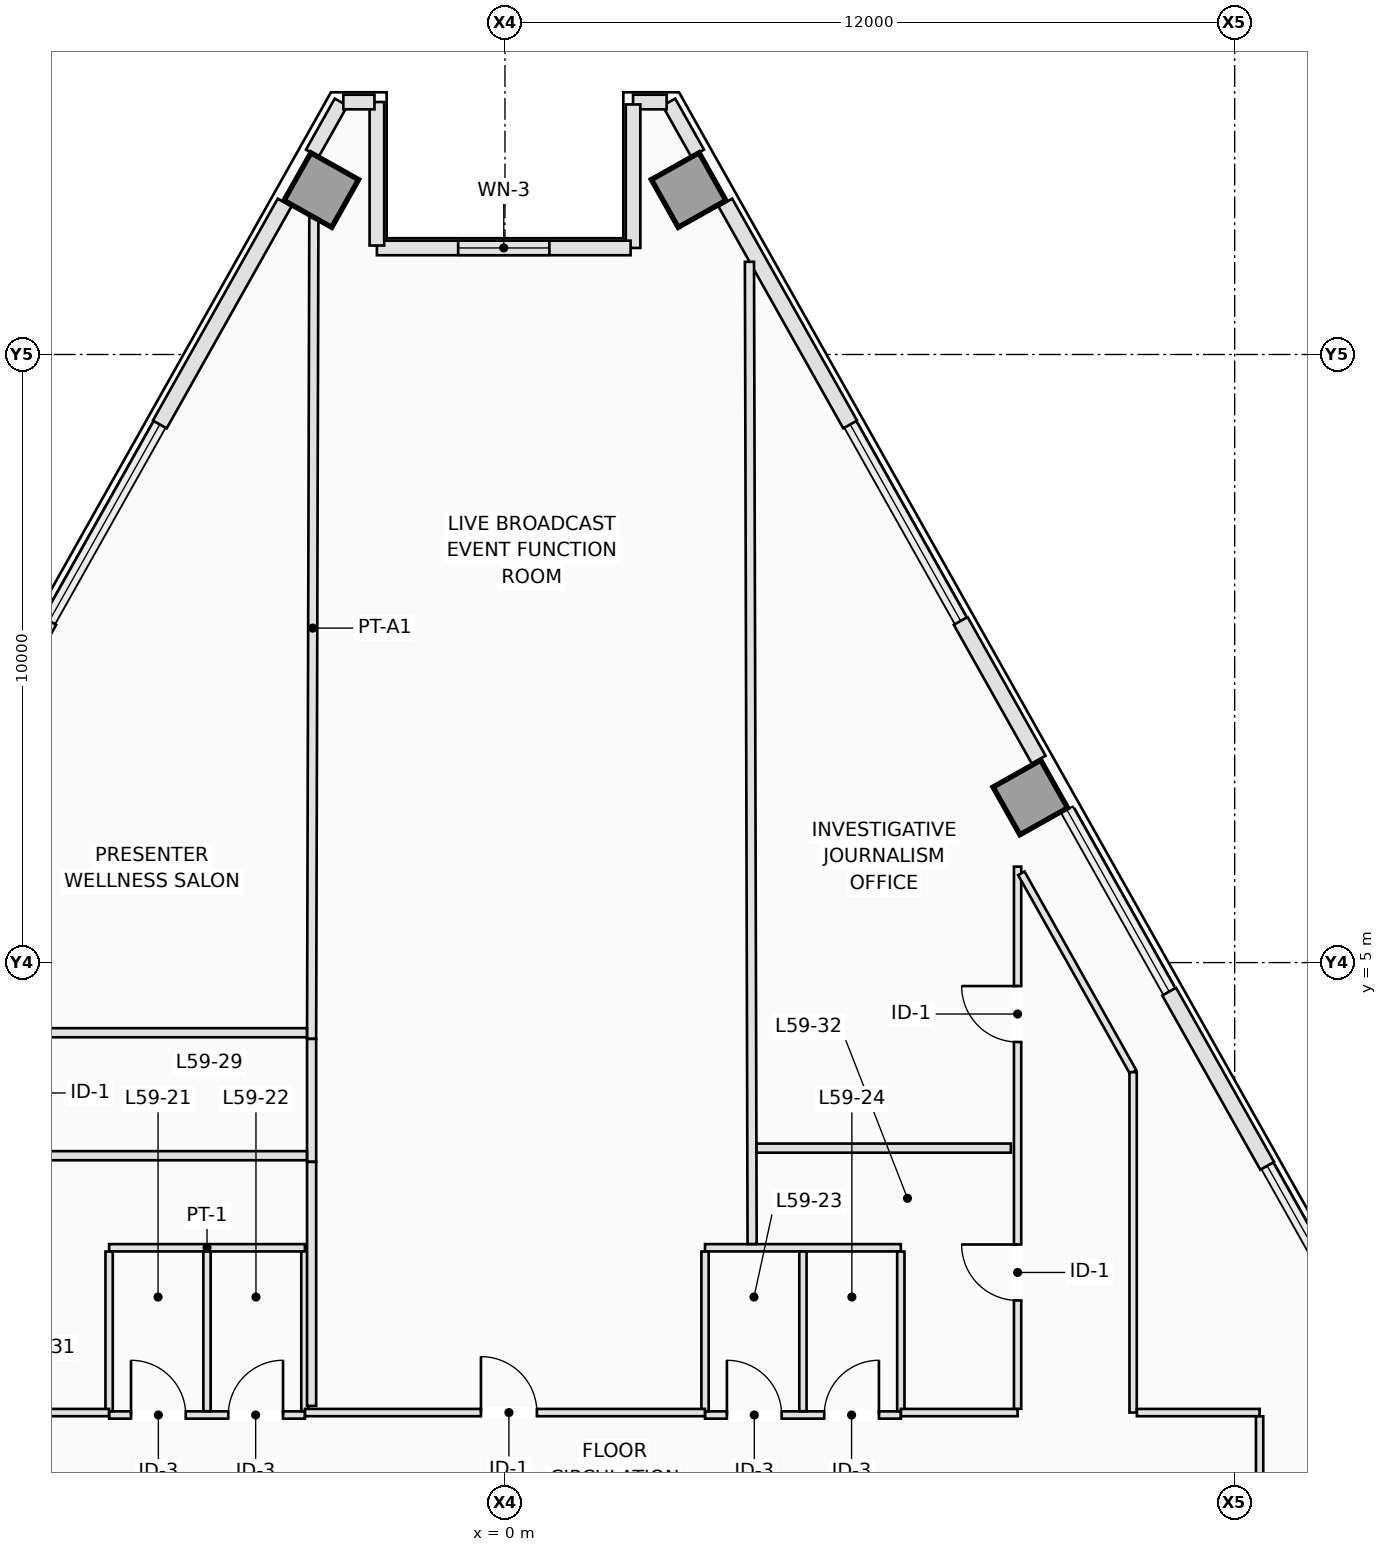
"""IFC4 building model, lengths in metres.
Left out: names, types, materials, properties, quantities, classifications, styles, units other than length and angle.
Written with IfcOpenShell. Run it as: python <this file> out.ifc"""

import sys

from ifc_helpers import new_model, si_unit, direction, frame, frame_2d, origin, origin_2d, place, context, subcontext, project, spatial, rectangle, extrude, element, fill, save


model = new_model("IFC4")
c1 = context("Model", 3, precision=1e-05, world=origin(), true_north=direction((0.0, 1.0)))
c2 = subcontext(c1, "Body", "Model", "MODEL_VIEW")
j1 = project(units=[si_unit("LENGTHUNIT", "METRE"), si_unit("PLANEANGLEUNIT", "RADIAN")], contexts=[c1])
p1 = place(None, origin())
s1 = spatial("IfcSite", under=j1, at=p1, CompositionType="ELEMENT")
p2 = place(p1, origin())
s2 = spatial("IfcBuilding", under=s1, at=p2, CompositionType="ELEMENT")
p3 = place(p2, frame((0.0, 0.0, 214.9)))
s3 = spatial("IfcBuildingStorey", under=s2, at=p3, CompositionType="ELEMENT", Elevation=214.9)
for number, where, z_axis, x_axis in (
    (1, (8.64, 7.715, 0.0), (0.0, 0.0, 1.0), (0.872, 0.49, 0.0)),
    (2, (3.021, 17.704, 0.0), (0.0, 0.0, 1.0), (0.872, 0.49, 0.0)),
    (3, (-3.021, 17.704, 0.0), (0.0, 0.0, 1.0), (-0.872, 0.49, 0.0)),
):
    element("IfcColumn", number, at=place(p3, frame(where, z_axis=z_axis, x_axis=x_axis)), inside=s3, PredefinedType="COLUMN", context=c2, shape_type="SweptSolid", body=[
        extrude(rectangle(XDim=0.9, YDim=0.9, at=origin_2d()), origin(), (0.0, 0.0, 1.0), 3.5),
    ])
p4 = place(p3, frame((2.695, 19.149, 0.0), z_axis=(0.0, 0.0, 1.0), x_axis=(0.490345412687, -0.87152818443, 0.0)))
e4 = element("IfcWall", 4, at=p4, inside=s3, PredefinedType="STANDARD", context=c2, shape_type="SweptSolid", body=[
    extrude(rectangle(XDim=0.964, YDim=0.24, at=frame_2d((0.482, 0.0))), origin(), (0.0, 0.0, 1.0), 3.25),
])
p5 = place(p3, frame((3.624, 17.499, 0.0), z_axis=(0.0, 0.0, 1.0), x_axis=(0.490275081837, -0.87156775074, 0.0)))
e5 = element("IfcWall", 5, at=p5, inside=s3, PredefinedType="STANDARD", context=c2, shape_type="SweptSolid", body=[
    extrude(rectangle(XDim=4.187, YDim=0.26, at=frame_2d((2.094, 0.0))), origin(), (0.0, 0.0, 1.0), 3.25),
])
p6 = place(p3, frame((7.494, 10.618, 0.0), z_axis=(0.0, 0.0, 1.0), x_axis=(0.490301099378, -0.871553114818, 0.0)))
e6 = element("IfcWall", 6, at=p6, inside=s3, PredefinedType="STANDARD", context=c2, shape_type="SweptSolid", body=[
    extrude(rectangle(XDim=2.617, YDim=0.26, at=frame_2d((1.309, 0.0))), origin(), (0.0, 0.0, 1.0), 3.25),
])
p7 = place(p3, frame((10.923, 4.522, 0.0), z_axis=(0.0, 0.0, 1.0), x_axis=(0.490264765862, -0.871573553611, 0.0)))
e7 = element("IfcWall", 7, at=p7, inside=s3, PredefinedType="STANDARD", context=c2, shape_type="SweptSolid", body=[
    extrude(rectangle(XDim=3.287, YDim=0.26, at=frame_2d((1.644, 0.0))), origin(), (0.0, 0.0, 1.0), 3.25),
])
p8 = place(p3, frame((-3.168, 18.309, 0.0), z_axis=(0.0, 0.0, 1.0), x_axis=(0.490345412687, 0.87152818443, 0.0)))
e8 = element("IfcWall", 8, at=p8, inside=s3, PredefinedType="STANDARD", context=c2, shape_type="SweptSolid", body=[
    extrude(rectangle(XDim=0.964, YDim=0.24, at=frame_2d((0.482, 0.0))), origin(), (0.0, 0.0, 1.0), 3.25),
])
p9 = place(p3, frame((-8.777, 8.337, 0.0), z_axis=(0.0, 0.0, 1.0), x_axis=(0.490301099378, 0.871553114818, 0.0)))
e9 = element("IfcWall", 9, at=p9, inside=s3, PredefinedType="STANDARD", context=c2, shape_type="SweptSolid", body=[
    extrude(rectangle(XDim=2.617, YDim=0.26, at=frame_2d((1.309, 0.0))), origin(), (0.0, 0.0, 1.0), 3.25),
])
p10 = place(p3, frame((-5.677, 13.85, 0.0), z_axis=(0.0, 0.0, 1.0), x_axis=(0.490275081837, 0.87156775074, 0.0)))
e10 = element("IfcWall", 10, at=p10, inside=s3, PredefinedType="STANDARD", context=c2, shape_type="SweptSolid", body=[
    extrude(rectangle(XDim=4.187, YDim=0.26, at=frame_2d((2.094, 0.0))), origin(), (0.0, 0.0, 1.0), 3.25),
])
p11 = place(p3, frame((2.658, 19.152, 0.0), z_axis=(0.0, 0.0, 1.0), x_axis=(-1.0, 0.0, 0.0)))
e11 = element("IfcWall", 11, at=p11, inside=s3, PredefinedType="STANDARD", context=c2, shape_type="SweptSolid", body=[
    extrude(rectangle(XDim=0.552, YDim=0.24, at=frame_2d((0.276, 0.0))), origin(), (0.0, 0.0, 1.0), 3.25),
])
p12 = place(p3, frame((2.106, 19.112, 0.0), z_axis=(0.0, 0.0, 1.0), x_axis=(0.0, -1.0, 0.0)))
e12 = element("IfcWall", 12, at=p12, inside=s3, PredefinedType="STANDARD", context=c2, shape_type="SweptSolid", body=[
    extrude(rectangle(XDim=2.36, YDim=0.24, at=frame_2d((1.18, 0.0))), origin(), (0.0, 0.0, 1.0), 3.25),
])
p13 = place(p3, frame((2.066, 16.752, 0.0), z_axis=(0.0, 0.0, 1.0), x_axis=(-1.0, 0.0, 0.0)))
e13 = element("IfcWall", 13, at=p13, inside=s3, PredefinedType="STANDARD", context=c2, shape_type="SweptSolid", body=[
    extrude(rectangle(XDim=4.172, YDim=0.24, at=frame_2d((2.086, 0.0))), origin(), (0.0, 0.0, 1.0), 3.25),
])
p14 = place(p13, frame((1.336, 0.0, 0.9)))
e14 = element("IfcOpeningElement", 14, at=p14, cuts=e13, PredefinedType="OPENING", context=c2, shape_type="SweptSolid", body=[
    extrude(rectangle(XDim=1.5, YDim=1.95, at=frame_2d((0.75, 0.975))), frame((0.0, 0.13, 0.0), z_axis=(0.0, -1.0, 0.0), x_axis=(1.0, 0.0, 0.0)), (0.0, 0.0, 1.0), 0.26),
])
p15 = place(p3, frame((-2.106, 16.792, 0.0), z_axis=(0.0, 0.0, 1.0), x_axis=(0.0, 1.0, 0.0)))
e15 = element("IfcWall", 15, at=p15, inside=s3, PredefinedType="STANDARD", context=c2, shape_type="SweptSolid", body=[
    extrude(rectangle(XDim=2.36, YDim=0.24, at=frame_2d((1.18, 0.0))), origin(), (0.0, 0.0, 1.0), 3.25),
])
p16 = place(p3, frame((-2.146, 19.152, 0.0), z_axis=(0.0, 0.0, 1.0), x_axis=(-1.0, 0.0, 0.0)))
e16 = element("IfcWall", 16, at=p16, inside=s3, PredefinedType="STANDARD", context=c2, shape_type="SweptSolid", body=[
    extrude(rectangle(XDim=0.512, YDim=0.24, at=frame_2d((0.256, 0.0))), origin(), (0.0, 0.0, 1.0), 3.25),
])
p17 = place(p3, frame((-6.51, -2.44, 0.0), z_axis=(0.0, 0.0, 1.0), x_axis=(1.0, 0.0, 0.0)))
e17 = element("IfcWall", 17, at=p17, inside=s3, PredefinedType="PARTITIONING", context=c2, shape_type="SweptSolid", body=[
    extrude(rectangle(XDim=3.22, YDim=0.12, at=frame_2d((1.61, 0.0))), origin(), (0.0, 0.0, 1.0), 2.943),
])
p18 = place(p17, frame((0.36, 0.0, 0.0)))
e18 = element("IfcOpeningElement", 18, at=p18, cuts=e17, PredefinedType="OPENING", context=c2, shape_type="SweptSolid", body=[
    extrude(rectangle(XDim=0.9, YDim=2.12, at=frame_2d((0.45, 1.06))), frame((0.0, 0.07, 0.0), z_axis=(0.0, -1.0, 0.0), x_axis=(1.0, 0.0, 0.0)), (0.0, 0.0, 1.0), 0.14),
])
p19 = place(p17, frame((1.96, 0.0, 0.0)))
e19 = element("IfcOpeningElement", 19, at=p19, cuts=e17, PredefinedType="OPENING", context=c2, shape_type="SweptSolid", body=[
    extrude(rectangle(XDim=0.9, YDim=2.12, at=frame_2d((0.45, 1.06))), frame((0.0, 0.07, 0.0), z_axis=(0.0, -1.0, 0.0), x_axis=(1.0, 0.0, 0.0)), (0.0, 0.0, 1.0), 0.14),
])
p20 = place(p3, frame((-6.51, 0.31, 0.0), z_axis=(0.0, 0.0, 1.0), x_axis=(1.0, 0.0, 0.0)))
e20 = element("IfcWall", 20, at=p20, inside=s3, PredefinedType="PARTITIONING", context=c2, shape_type="SweptSolid", body=[
    extrude(rectangle(XDim=3.22, YDim=0.12, at=frame_2d((1.61, 0.0))), origin(), (0.0, 0.0, 1.0), 3.25),
])
for number, where, z_axis, x_axis in (
    (21, (-6.51, -2.378, 0.0), (0.0, 0.0, 1.0), (0.0, 1.0, 0.0)),
    (22, (-4.9, -2.378, 0.0), (0.0, 0.0, 1.0), (0.0, 1.0, 0.0)),
    (23, (-3.29, -2.378, 0.0), (0.0, 0.0, 1.0), (0.0, 1.0, 0.0)),
):
    element("IfcWall", number, at=place(p3, frame(where, z_axis=z_axis, x_axis=x_axis)), inside=s3, PredefinedType="PARTITIONING", context=c2, shape_type="SweptSolid", body=[
        extrude(rectangle(XDim=2.626, YDim=0.12, at=frame_2d((1.313, 0.0))), origin(), (0.0, 0.0, 1.0), 3.25),
    ])
p21 = place(p3, frame((3.29, -2.44, 0.0), z_axis=(0.0, 0.0, 1.0), x_axis=(1.0, 0.0, 0.0)))
e24 = element("IfcWall", 24, at=p21, inside=s3, PredefinedType="PARTITIONING", context=c2, shape_type="SweptSolid", body=[
    extrude(rectangle(XDim=3.22, YDim=0.12, at=frame_2d((1.61, 0.0))), origin(), (0.0, 0.0, 1.0), 2.943),
])
p22 = place(p21, frame((0.36, 0.0, 0.0)))
e25 = element("IfcOpeningElement", 25, at=p22, cuts=e24, PredefinedType="OPENING", context=c2, shape_type="SweptSolid", body=[
    extrude(rectangle(XDim=0.9, YDim=2.12, at=frame_2d((0.45, 1.06))), frame((0.0, 0.07, 0.0), z_axis=(0.0, -1.0, 0.0), x_axis=(1.0, 0.0, 0.0)), (0.0, 0.0, 1.0), 0.14),
])
p23 = place(p21, frame((1.96, 0.0, 0.0)))
e26 = element("IfcOpeningElement", 26, at=p23, cuts=e24, PredefinedType="OPENING", context=c2, shape_type="SweptSolid", body=[
    extrude(rectangle(XDim=0.9, YDim=2.12, at=frame_2d((0.45, 1.06))), frame((0.0, 0.07, 0.0), z_axis=(0.0, -1.0, 0.0), x_axis=(1.0, 0.0, 0.0)), (0.0, 0.0, 1.0), 0.14),
])
p24 = place(p3, frame((3.29, 0.31, 0.0), z_axis=(0.0, 0.0, 1.0), x_axis=(1.0, 0.0, 0.0)))
e27 = element("IfcWall", 27, at=p24, inside=s3, PredefinedType="PARTITIONING", context=c2, shape_type="SweptSolid", body=[
    extrude(rectangle(XDim=3.22, YDim=0.12, at=frame_2d((1.61, 0.0))), origin(), (0.0, 0.0, 1.0), 3.25),
])
for number, where, z_axis, x_axis in (
    (28, (3.29, -2.378, 0.0), (0.0, 0.0, 1.0), (0.0, 1.0, 0.0)),
    (29, (4.9, -2.378, 0.0), (0.0, 0.0, 1.0), (0.0, 1.0, 0.0)),
    (30, (6.51, -2.378, 0.0), (0.0, 0.0, 1.0), (0.0, 1.0, 0.0)),
):
    element("IfcWall", number, at=place(p3, frame(where, z_axis=z_axis, x_axis=x_axis)), inside=s3, PredefinedType="PARTITIONING", context=c2, shape_type="SweptSolid", body=[
        extrude(rectangle(XDim=2.626, YDim=0.12, at=frame_2d((1.313, 0.0))), origin(), (0.0, 0.0, 1.0), 3.25),
    ])
p25 = place(p3, frame((-8.508, -2.4, 0.0), z_axis=(0.0, 0.0, 1.0), x_axis=(1.0, 0.0, 0.0)))
e31 = element("IfcWall", 31, at=p25, inside=s3, PredefinedType="PARTITIONING", context=c2, shape_type="SweptSolid", body=[
    extrude(rectangle(XDim=1.996, YDim=0.12, at=frame_2d((0.998, 0.0))), origin(), (0.0, 0.0, 1.0), 3.25),
])
p26 = place(p3, frame((-3.288, -2.4, 0.0), z_axis=(0.0, 0.0, 1.0), x_axis=(1.0, 0.0, 0.0)))
e32 = element("IfcWall", 32, at=p26, inside=s3, PredefinedType="PARTITIONING", context=c2, shape_type="SweptSolid", body=[
    extrude(rectangle(XDim=6.576, YDim=0.12, at=frame_2d((3.288, 0.0))), origin(), (0.0, 0.0, 1.0), 2.943),
])
p27 = place(p26, frame((2.893, 0.0, 0.0)))
e33 = element("IfcOpeningElement", 33, at=p27, cuts=e32, PredefinedType="OPENING", context=c2, shape_type="SweptSolid", body=[
    extrude(rectangle(XDim=0.92, YDim=2.12, at=frame_2d((0.46, 1.06))), frame((0.0, 0.07, 0.0), z_axis=(0.0, -1.0, 0.0), x_axis=(1.0, 0.0, 0.0)), (0.0, 0.0, 1.0), 0.14),
])
p28 = place(p3, frame((6.512, -2.4, 0.0), z_axis=(0.0, 0.0, 1.0), x_axis=(1.0, 0.0, 0.0)))
e34 = element("IfcWall", 34, at=p28, inside=s3, PredefinedType="PARTITIONING", context=c2, shape_type="SweptSolid", body=[
    extrude(rectangle(XDim=1.918, YDim=0.12, at=frame_2d((0.959, 0.0))), origin(), (0.0, 0.0, 1.0), 3.25),
])
p29 = place(p3, frame((8.43, -2.338, 0.0), z_axis=(0.0, 0.0, 1.0), x_axis=(0.0, 1.0, 0.0)))
e35 = element("IfcWall", 35, at=p29, inside=s3, PredefinedType="PARTITIONING", context=c2, shape_type="SweptSolid", body=[
    extrude(rectangle(XDim=8.916, YDim=0.12, at=frame_2d((4.458, 0.0))), origin(), (0.0, 0.0, 1.0), 3.25),
])
p30 = place(p29, frame((6.032, 0.0, 0.0)))
e36 = element("IfcOpeningElement", 36, at=p30, cuts=e35, PredefinedType="OPENING", context=c2, shape_type="SweptSolid", body=[
    extrude(rectangle(XDim=0.92, YDim=2.12, at=frame_2d((0.46, 1.06))), frame((0.0, 0.07, 0.0), z_axis=(0.0, -1.0, 0.0), x_axis=(1.0, 0.0, 0.0)), (0.0, 0.0, 1.0), 0.14),
])
p31 = place(p29, frame((1.782, 0.0, 0.0)))
e37 = element("IfcOpeningElement", 37, at=p31, cuts=e35, PredefinedType="OPENING", context=c2, shape_type="SweptSolid", body=[
    extrude(rectangle(XDim=0.92, YDim=2.12, at=frame_2d((0.46, 1.06))), frame((0.0, 0.07, 0.0), z_axis=(0.0, -1.0, 0.0), x_axis=(1.0, 0.0, 0.0)), (0.0, 0.0, 1.0), 0.14),
])
p32 = place(p3, frame((8.492, 6.468, 0.0), z_axis=(0.0, 0.0, 1.0), x_axis=(0.49025814807, -0.871577276121, 0.0)))
e38 = element("IfcWall", 38, at=p32, inside=s3, PredefinedType="PARTITIONING", context=c2, shape_type="SweptSolid", body=[
    extrude(rectangle(XDim=3.749, YDim=0.12, at=frame_2d((1.875, 0.0))), origin(), (0.0, 0.0, 1.0), 3.25),
])
p33 = place(p3, frame((10.33, 3.198, 0.0), z_axis=(0.0, 0.0, 1.0), x_axis=(0.0, -1.0, 0.0)))
e39 = element("IfcWall", 39, at=p33, inside=s3, PredefinedType="PARTITIONING", context=c2, shape_type="SweptSolid", body=[
    extrude(rectangle(XDim=5.598, YDim=0.12, at=frame_2d((2.799, 0.0))), origin(), (0.0, 0.0, 1.0), 3.25),
])
p34 = place(p3, frame((10.392, -2.4, 0.0), z_axis=(0.0, 0.0, 1.0), x_axis=(1.0, 0.0, 0.0)))
e40 = element("IfcWall", 40, at=p34, inside=s3, PredefinedType="PARTITIONING", context=c2, shape_type="SweptSolid", body=[
    extrude(rectangle(XDim=2.018, YDim=0.12, at=frame_2d((1.009, 0.0))), origin(), (0.0, 0.0, 1.0), 3.25),
])
p35 = place(p3, frame((12.41, -2.462, 0.0), z_axis=(0.0, 0.0, 1.0), x_axis=(0.0, -1.0, 0.0)))
e41 = element("IfcWall", 41, at=p35, inside=s3, PredefinedType="PARTITIONING", context=c2, shape_type="SweptSolid", body=[
    extrude(rectangle(XDim=2.611, YDim=0.12, at=frame_2d((1.306, 0.0))), origin(), (0.0, 0.0, 1.0), 3.25),
])
p36 = place(p3, frame((-3.143, 17.254, 0.0), z_axis=(0.0, 0.0, 1.0), x_axis=(-0.002783390028, -0.999996126362, 0.0)))
e42 = element("IfcWall", 42, at=p36, inside=s3, PredefinedType="PARTITIONING", context=c2, shape_type="SweptSolid", body=[
    extrude(rectangle(XDim=13.508, YDim=0.15, at=frame_2d((6.754, 0.0))), origin(), (0.0, 0.0, 1.0), 2.722),
])
p37 = place(p3, frame((-3.257, 3.846, 0.0), z_axis=(0.0, 0.0, 1.0), x_axis=(-1.0, 0.0, 0.0)))
e43 = element("IfcWall", 43, at=p37, inside=s3, PredefinedType="PARTITIONING", context=c2, shape_type="SweptSolid", body=[
    extrude(rectangle(XDim=5.203, YDim=0.15, at=frame_2d((2.602, 0.0))), origin(), (0.0, 0.0, 1.0), 2.943),
])
p38 = place(p3, frame((4.021, 16.524, 0.0), z_axis=(0.0, 0.0, 1.0), x_axis=(0.002705593265, -0.999996339876, 0.0)))
e44 = element("IfcWall", 44, at=p38, inside=s3, PredefinedType="PARTITIONING", context=c2, shape_type="SweptSolid", body=[
    extrude(rectangle(XDim=16.152, YDim=0.15, at=frame_2d((8.076, 0.0))), origin(), (0.0, 0.0, 1.0), 3.25),
])
p39 = place(p3, frame((-3.18, 1.724, 0.0), z_axis=(0.0, 0.0, 1.0), x_axis=(0.0, 1.0, 0.0)))
e45 = element("IfcWall", 45, at=p39, inside=s3, PredefinedType="PARTITIONING", context=c2, shape_type="SweptSolid", body=[
    extrude(rectangle(XDim=2.02, YDim=0.15, at=frame_2d((1.01, 0.0))), origin(), (0.0, 0.0, 1.0), 3.25),
])
p40 = place(p3, frame((-3.18, -2.29, 0.0), z_axis=(0.0, 0.0, 1.0), x_axis=(0.0, 1.0, 0.0)))
e46 = element("IfcWall", 46, at=p40, inside=s3, PredefinedType="PARTITIONING", context=c2, shape_type="SweptSolid", body=[
    extrude(rectangle(XDim=4.012, YDim=0.15, at=frame_2d((2.006, 0.0))), origin(), (0.0, 0.0, 1.0), 3.25),
])
p41 = place(p3, frame((8.32, 1.948, 0.0), z_axis=(0.0, 0.0, 1.0), x_axis=(-1.0, 0.0, 0.0)))
e47 = element("IfcWall", 47, at=p41, inside=s3, PredefinedType="PARTITIONING", context=c2, shape_type="SweptSolid", body=[
    extrude(rectangle(XDim=4.183, YDim=0.15, at=frame_2d((2.092, 0.0))), origin(), (0.0, 0.0, 1.0), 3.25),
])
p42 = place(p3, frame((-3.257, 1.824, 0.0), z_axis=(0.0, 0.0, 1.0), x_axis=(-1.0, 0.0, 0.0)))
e48 = element("IfcWall", 48, at=p42, inside=s3, PredefinedType="PARTITIONING", context=c2, shape_type="SweptSolid", body=[
    extrude(rectangle(XDim=5.203, YDim=0.15, at=frame_2d((2.602, 0.0))), origin(), (0.0, 0.0, 1.0), 3.25),
])
p43 = place(p14, origin())
e49 = element("IfcWindow", 49, at=p43, inside=s3, PartitioningType="SINGLE_PANEL", PredefinedType="WINDOW", context=c2, shape_type="SweptSolid", body=[
    extrude(rectangle(XDim=1.5, YDim=1.95, at=frame_2d((0.75, 0.975))), frame((0.0, 0.03, 0.0), z_axis=(0.0, -1.0, 0.0), x_axis=(1.0, 0.0, 0.0)), (0.0, 0.0, 1.0), 0.06),
])
fill(e14, e49)
p44 = place(p18, origin())
e50 = element("IfcDoor", 50, at=p44, inside=s3, OperationType="SINGLE_SWING_LEFT", PredefinedType="DOOR", context=c2, shape_type="SweptSolid", body=[
    extrude(rectangle(XDim=0.9, YDim=2.12, at=frame_2d((0.45, 1.06))), frame((0.0, 0.025, 0.0), z_axis=(0.0, -1.0, 0.0), x_axis=(1.0, 0.0, 0.0)), (0.0, 0.0, 1.0), 0.05),
])
fill(e18, e50)
p45 = place(p19, origin())
e51 = element("IfcDoor", 51, at=p45, inside=s3, OperationType="SINGLE_SWING_RIGHT", PredefinedType="DOOR", context=c2, shape_type="SweptSolid", body=[
    extrude(rectangle(XDim=0.9, YDim=2.12, at=frame_2d((0.45, 1.06))), frame((0.0, 0.025, 0.0), z_axis=(0.0, -1.0, 0.0), x_axis=(1.0, 0.0, 0.0)), (0.0, 0.0, 1.0), 0.05),
])
fill(e19, e51)
p46 = place(p22, origin())
e52 = element("IfcDoor", 52, at=p46, inside=s3, OperationType="SINGLE_SWING_LEFT", PredefinedType="DOOR", context=c2, shape_type="SweptSolid", body=[
    extrude(rectangle(XDim=0.9, YDim=2.12, at=frame_2d((0.45, 1.06))), frame((0.0, 0.025, 0.0), z_axis=(0.0, -1.0, 0.0), x_axis=(1.0, 0.0, 0.0)), (0.0, 0.0, 1.0), 0.05),
])
fill(e25, e52)
p47 = place(p23, origin())
e53 = element("IfcDoor", 53, at=p47, inside=s3, OperationType="SINGLE_SWING_RIGHT", PredefinedType="DOOR", context=c2, shape_type="SweptSolid", body=[
    extrude(rectangle(XDim=0.9, YDim=2.12, at=frame_2d((0.45, 1.06))), frame((0.0, 0.025, 0.0), z_axis=(0.0, -1.0, 0.0), x_axis=(1.0, 0.0, 0.0)), (0.0, 0.0, 1.0), 0.05),
])
fill(e26, e53)
p48 = place(p27, origin())
e54 = element("IfcDoor", 54, at=p48, inside=s3, OperationType="SINGLE_SWING_LEFT", PredefinedType="DOOR", context=c2, shape_type="SweptSolid", body=[
    extrude(rectangle(XDim=0.92, YDim=2.12, at=frame_2d((0.46, 1.06))), frame((0.0, 0.025, 0.0), z_axis=(0.0, -1.0, 0.0), x_axis=(1.0, 0.0, 0.0)), (0.0, 0.0, 1.0), 0.05),
])
fill(e33, e54)
p49 = place(p30, origin())
e55 = element("IfcDoor", 55, at=p49, inside=s3, OperationType="SINGLE_SWING_RIGHT", PredefinedType="DOOR", context=c2, shape_type="SweptSolid", body=[
    extrude(rectangle(XDim=0.92, YDim=2.12, at=frame_2d((0.46, 1.06))), frame((0.0, 0.025, 0.0), z_axis=(0.0, -1.0, 0.0), x_axis=(1.0, 0.0, 0.0)), (0.0, 0.0, 1.0), 0.05),
])
fill(e36, e55)
p50 = place(p31, origin())
e56 = element("IfcDoor", 56, at=p50, inside=s3, OperationType="SINGLE_SWING_RIGHT", PredefinedType="DOOR", context=c2, shape_type="SweptSolid", body=[
    extrude(rectangle(XDim=0.92, YDim=2.12, at=frame_2d((0.46, 1.06))), frame((0.0, 0.025, 0.0), z_axis=(0.0, -1.0, 0.0), x_axis=(1.0, 0.0, 0.0)), (0.0, 0.0, 1.0), 0.05),
])
fill(e37, e56)
save(model, sys.argv[1])
